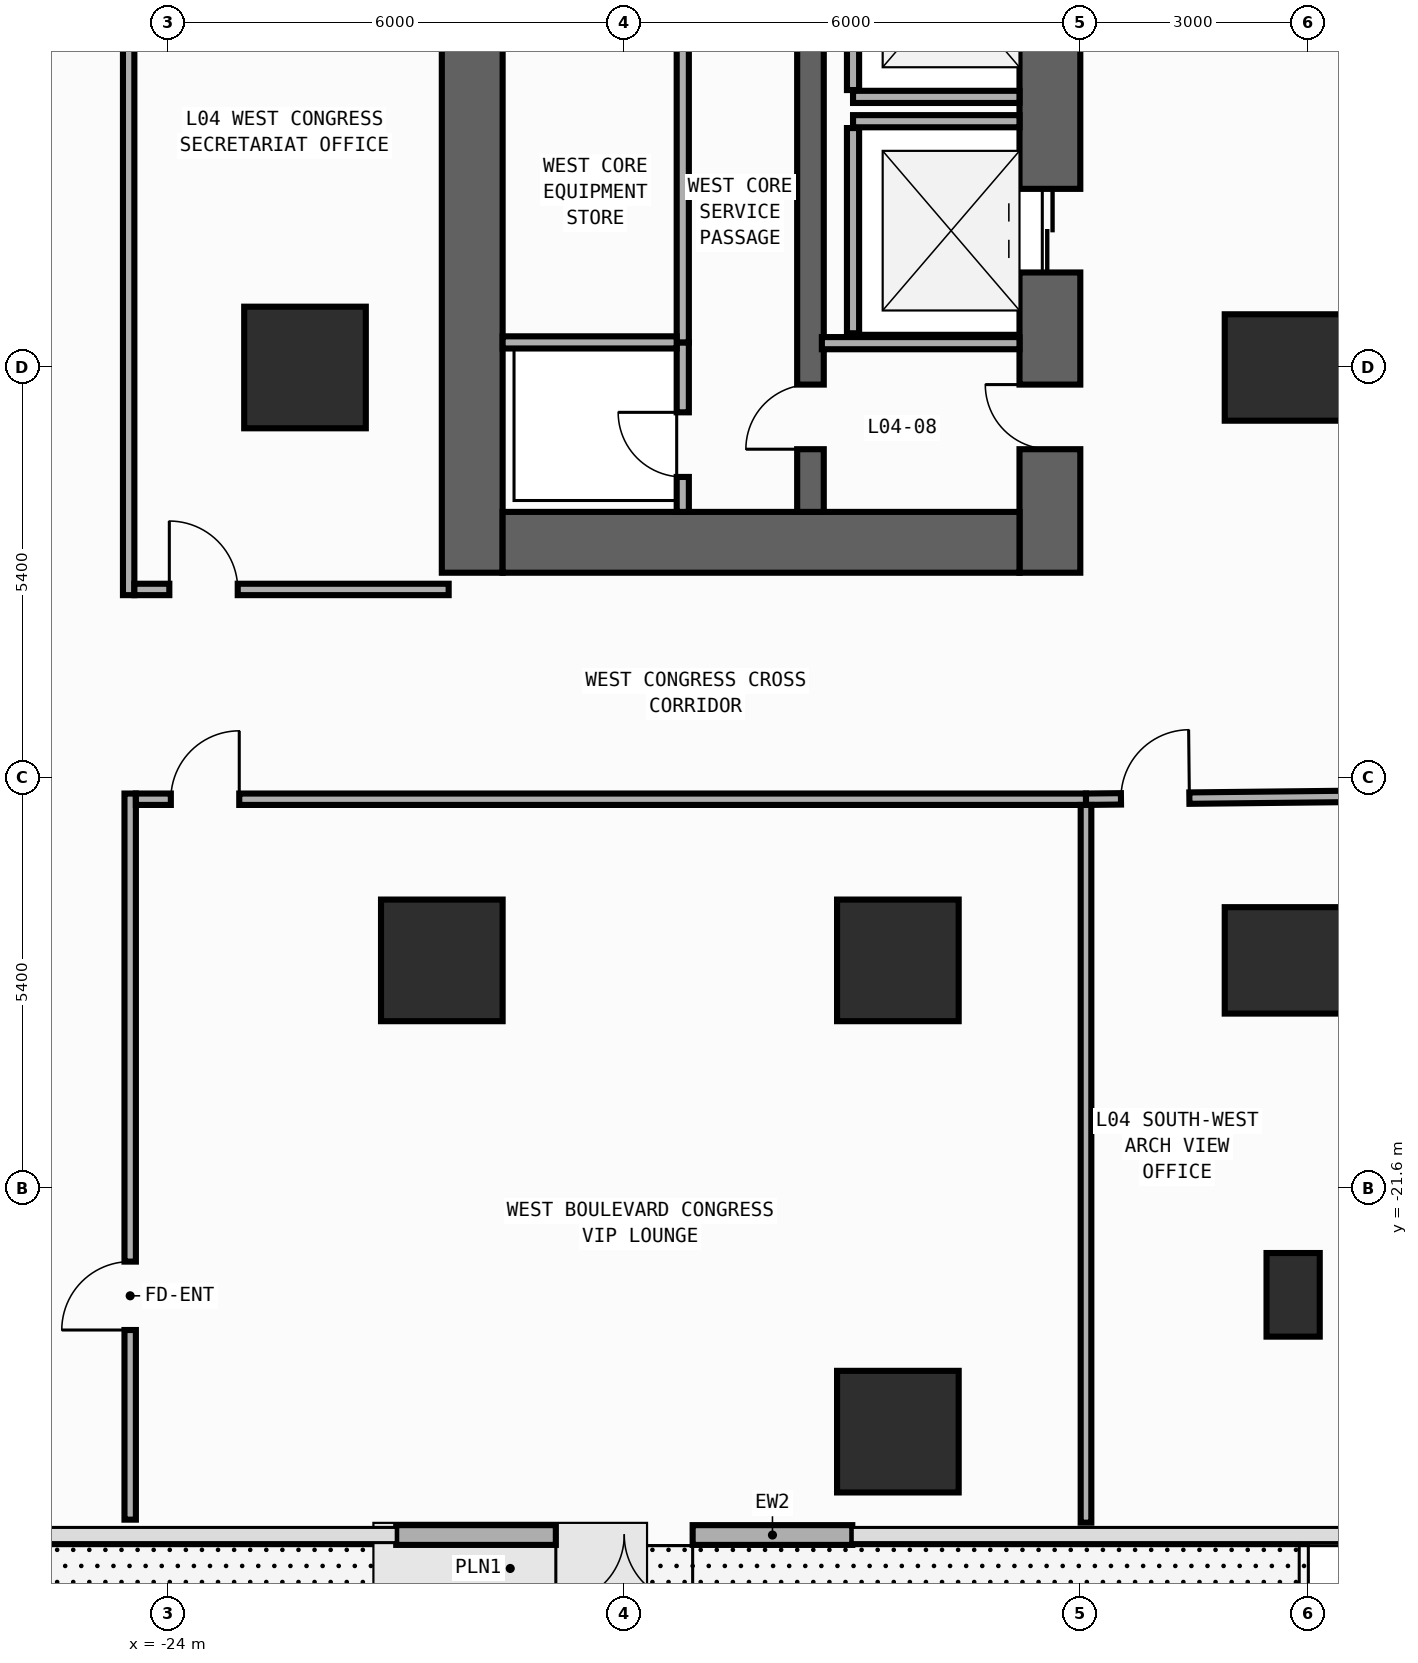
"""IFC4 building model, lengths in metres.
Left out: names, types, materials, properties, quantities, classifications, styles, units other than length and angle.
Written with IfcOpenShell. Run it as: python <this file> out.ifc"""

import sys

from ifc_helpers import new_model, si_unit, direction, frame, frame_2d, origin, origin_2d, place, context, subcontext, project, spatial, rectangle, extrude, element, fill, save


model = new_model("IFC4")
c1 = context("Model", 3, precision=1e-05, world=origin(), true_north=direction((0.0, 1.0)))
c2 = subcontext(c1, "Body", "Model", "MODEL_VIEW")
j1 = project(units=[si_unit("LENGTHUNIT", "METRE"), si_unit("PLANEANGLEUNIT", "RADIAN")], contexts=[c1])
p1 = place(None, origin())
s1 = spatial("IfcSite", under=j1, at=p1, CompositionType="ELEMENT")
p2 = place(p1, origin())
s2 = spatial("IfcBuilding", under=s1, at=p2, CompositionType="ELEMENT")
p3 = place(p2, frame((0.0, 0.0, 16.0)))
s3 = spatial("IfcBuildingStorey", under=s2, at=p3, CompositionType="ELEMENT", Elevation=16.0)
p4 = place(p3, frame((-20.0, -13.5, 0.0), z_axis=(0.0, 0.0, 1.0), x_axis=(0.0, 1.0, 0.0)))
e1 = element("IfcWall", 1, at=p4, inside=s3, PredefinedType="SHEAR", context=c2, shape_type="SweptSolid", body=[
    extrude(rectangle(XDim=27.0, YDim=0.8, at=frame_2d((13.5, 0.0))), origin(), (0.0, 0.0, 1.0), 4.55),
])
p5 = place(p3, frame((-12.4, -13.5, 0.0), z_axis=(0.0, 0.0, 1.0), x_axis=(0.0, 1.0, 0.0)))
e2 = element("IfcWall", 2, at=p5, inside=s3, PredefinedType="SHEAR", context=c2, shape_type="SweptSolid", body=[
    extrude(rectangle(XDim=27.0, YDim=0.8, at=frame_2d((13.5, 0.0))), origin(), (0.0, 0.0, 1.0), 4.55),
])
p6 = place(p5, frame((21.55, 0.0, 0.0)))
e3 = element("IfcOpeningElement", 3, at=p6, cuts=e2, PredefinedType="OPENING", context=c2, shape_type="SweptSolid", body=[
    extrude(rectangle(XDim=1.1, YDim=2.2, at=frame_2d((0.55, 1.1))), frame((0.0, 0.41, 0.0), z_axis=(0.0, -1.0, 0.0), x_axis=(1.0, 0.0, 0.0)), (0.0, 0.0, 1.0), 0.82),
])
p7 = place(p5, frame((18.35, 0.0, 0.0)))
e4 = element("IfcOpeningElement", 4, at=p7, cuts=e2, PredefinedType="OPENING", context=c2, shape_type="SweptSolid", body=[
    extrude(rectangle(XDim=1.1, YDim=2.2, at=frame_2d((0.55, 1.1))), frame((0.0, 0.41, 0.0), z_axis=(0.0, -1.0, 0.0), x_axis=(1.0, 0.0, 0.0)), (0.0, 0.0, 1.0), 0.82),
])
p8 = place(p5, frame((15.15, 0.0, 0.0)))
e5 = element("IfcOpeningElement", 5, at=p8, cuts=e2, PredefinedType="OPENING", context=c2, shape_type="SweptSolid", body=[
    extrude(rectangle(XDim=1.1, YDim=2.2, at=frame_2d((0.55, 1.1))), frame((0.0, 0.41, 0.0), z_axis=(0.0, -1.0, 0.0), x_axis=(1.0, 0.0, 0.0)), (0.0, 0.0, 1.0), 0.82),
])
p9 = place(p5, frame((10.35, 0.0, 0.0)))
e6 = element("IfcOpeningElement", 6, at=p9, cuts=e2, PredefinedType="OPENING", context=c2, shape_type="SweptSolid", body=[
    extrude(rectangle(XDim=1.1, YDim=2.2, at=frame_2d((0.55, 1.1))), frame((0.0, 0.41, 0.0), z_axis=(0.0, -1.0, 0.0), x_axis=(1.0, 0.0, 0.0)), (0.0, 0.0, 1.0), 0.82),
])
p10 = place(p5, frame((7.15, 0.0, 0.0)))
e7 = element("IfcOpeningElement", 7, at=p10, cuts=e2, PredefinedType="OPENING", context=c2, shape_type="SweptSolid", body=[
    extrude(rectangle(XDim=1.1, YDim=2.2, at=frame_2d((0.55, 1.1))), frame((0.0, 0.41, 0.0), z_axis=(0.0, -1.0, 0.0), x_axis=(1.0, 0.0, 0.0)), (0.0, 0.0, 1.0), 0.82),
])
p11 = place(p5, frame((3.95, 0.0, 0.0)))
e8 = element("IfcOpeningElement", 8, at=p11, cuts=e2, PredefinedType="OPENING", context=c2, shape_type="SweptSolid", body=[
    extrude(rectangle(XDim=1.1, YDim=2.2, at=frame_2d((0.55, 1.1))), frame((0.0, 0.41, 0.0), z_axis=(0.0, -1.0, 0.0), x_axis=(1.0, 0.0, 0.0)), (0.0, 0.0, 1.0), 0.82),
])
p12 = place(p5, frame((12.725, 0.0, 0.0)))
e9 = element("IfcOpeningElement", 9, at=p12, cuts=e2, PredefinedType="OPENING", context=c2, shape_type="SweptSolid", body=[
    extrude(rectangle(XDim=1.15, YDim=2.2, at=frame_2d((0.575, 1.1))), frame((0.0, 0.41, 0.0), z_axis=(0.0, -1.0, 0.0), x_axis=(1.0, 0.0, 0.0)), (0.0, 0.0, 1.0), 0.82),
])
p13 = place(p5, frame((1.625, 0.0, 0.0)))
e10 = element("IfcOpeningElement", 10, at=p13, cuts=e2, PredefinedType="OPENING", context=c2, shape_type="SweptSolid", body=[
    extrude(rectangle(XDim=0.85, YDim=2.1, at=frame_2d((0.425, 1.05))), frame((0.0, 0.41, 0.0), z_axis=(0.0, -1.0, 0.0), x_axis=(1.0, 0.0, 0.0)), (0.0, 0.0, 1.0), 0.82),
])
p14 = place(p3, frame((-19.6, -13.1, 0.0), z_axis=(0.0, 0.0, 1.0), x_axis=(1.0, 0.0, 0.0)))
e11 = element("IfcWall", 11, at=p14, inside=s3, PredefinedType="SHEAR", context=c2, shape_type="SweptSolid", body=[
    extrude(rectangle(XDim=6.8, YDim=0.8, at=frame_2d((3.4, 0.0))), origin(), (0.0, 0.0, 1.0), 4.55),
])
p15 = place(p3, frame((-15.55, -12.7, 0.0), z_axis=(0.0, 0.0, 1.0), x_axis=(0.0, 1.0, 0.0)))
e12 = element("IfcWall", 12, at=p15, inside=s3, PredefinedType="SHEAR", context=c2, shape_type="SweptSolid", body=[
    extrude(rectangle(XDim=25.4, YDim=0.35, at=frame_2d((12.7, 0.0))), origin(), (0.0, 0.0, 1.0), 4.55),
])
p16 = place(p15, frame((11.925, 0.0, 0.0)))
e13 = element("IfcOpeningElement", 13, at=p16, cuts=e12, PredefinedType="OPENING", context=c2, shape_type="SweptSolid", body=[
    extrude(rectangle(XDim=1.15, YDim=2.2, at=frame_2d((0.575, 1.1))), frame((0.0, 0.185, 0.0), z_axis=(0.0, -1.0, 0.0), x_axis=(1.0, 0.0, 0.0)), (0.0, 0.0, 1.0), 0.37),
])
p17 = place(p15, frame((0.825, 0.0, 0.0)))
e14 = element("IfcOpeningElement", 14, at=p17, cuts=e12, PredefinedType="OPENING", context=c2, shape_type="SweptSolid", body=[
    extrude(rectangle(XDim=0.85, YDim=2.1, at=frame_2d((0.425, 1.05))), frame((0.0, 0.185, 0.0), z_axis=(0.0, -1.0, 0.0), x_axis=(1.0, 0.0, 0.0)), (0.0, 0.0, 1.0), 0.37),
])
for number, where, z_axis, x_axis in (
    (15, (-9.2, -18.6, 0.0), (0.0, 0.0, 1.0), (1.0, 0.0, 0.0)),
    (16, (-9.2, -10.8, 0.0), (0.0, 0.0, 1.0), (1.0, 0.0, 0.0)),
):
    element("IfcColumn", number, at=place(p3, frame(where, z_axis=z_axis, x_axis=x_axis)), inside=s3, PredefinedType="COLUMN", context=c2, shape_type="SweptSolid", body=[
        extrude(rectangle(XDim=1.8, YDim=1.4, at=origin_2d()), origin(), (0.0, 0.0, 1.0), 5.0),
    ])
for number, where, z_axis, x_axis in (
    (17, (-20.4, -18.6, 0.0), (0.0, 0.0, 1.0), (1.0, 0.0, 0.0)),
    (18, (-14.4, -18.6, 0.0), (0.0, 0.0, 1.0), (1.0, 0.0, 0.0)),
    (19, (-22.2, -10.8, 0.0), (0.0, 0.0, 1.0), (1.0, 0.0, 0.0)),
    (20, (-14.4, -24.8, 0.0), (0.0, 0.0, 1.0), (1.0, 0.0, 0.0)),
):
    element("IfcColumn", number, at=place(p3, frame(where, z_axis=z_axis, x_axis=x_axis)), inside=s3, PredefinedType="COLUMN", context=c2, shape_type="SweptSolid", body=[
        extrude(rectangle(XDim=1.6, YDim=1.6, at=origin_2d()), origin(), (0.0, 0.0, 1.0), 5.0),
    ])
p18 = place(p3, frame((-9.2, -23.0, 0.0), z_axis=(0.0, 0.0, 1.0), x_axis=(1.0, 0.0, 0.0)))
e21 = element("IfcColumn", 21, at=p18, inside=s3, PredefinedType="PILASTER", context=c2, shape_type="SweptSolid", body=[
    extrude(rectangle(XDim=0.7, YDim=1.1, at=origin_2d()), origin(), (0.0, 0.0, 1.0), 5.0),
])
p19 = place(p3, frame((-15.0, -26.16, 0.0), z_axis=(0.0, 0.0, 1.0), x_axis=(-1.0, 0.0, 0.0)))
e22 = element("IfcWall", 22, at=p19, inside=s3, PredefinedType="STANDARD", context=c2, shape_type="SweptSolid", body=[
    extrude(rectangle(XDim=6.0, YDim=0.26, at=frame_2d((3.0, 0.0))), origin(), (0.0, 0.0, 1.0), 4.55),
])
p20 = place(p19, frame((2.1, 0.0, 0.0)))
e23 = element("IfcOpeningElement", 23, at=p20, cuts=e22, PredefinedType="OPENING", context=c2, shape_type="SweptSolid", body=[
    extrude(rectangle(XDim=1.8, YDim=2.3, at=frame_2d((0.9, 1.15))), frame((0.0, 0.14, 0.0), z_axis=(0.0, -1.0, 0.0), x_axis=(1.0, 0.0, 0.0)), (0.0, 0.0, 1.0), 0.28),
])
p21 = place(p3, frame((-14.99, -7.24, 0.0), z_axis=(0.0, 0.0, 1.0), x_axis=(1.0, 0.0, 0.0)))
e24 = element("IfcWall", 24, at=p21, inside=s3, PredefinedType="STANDARD", context=c2, shape_type="SweptSolid", body=[
    extrude(rectangle(XDim=2.19, YDim=0.16, at=frame_2d((1.095, 0.0))), origin(), (0.0, 0.0, 1.0), 4.55),
])
p22 = place(p3, frame((-14.99, -7.15, 0.0), z_axis=(0.0, 0.0, 1.0), x_axis=(0.0, 1.0, 0.0)))
e25 = element("IfcWall", 25, at=p22, inside=s3, PredefinedType="STANDARD", context=c2, shape_type="SweptSolid", body=[
    extrude(rectangle(XDim=2.7, YDim=0.16, at=frame_2d((1.35, 0.0))), origin(), (0.0, 0.0, 1.0), 4.55),
])
p23 = place(p3, frame((-14.99, -7.56, 0.0), z_axis=(0.0, 0.0, 1.0), x_axis=(1.0, 0.0, 0.0)))
e26 = element("IfcWall", 26, at=p23, inside=s3, PredefinedType="STANDARD", context=c2, shape_type="SweptSolid", body=[
    extrude(rectangle(XDim=2.19, YDim=0.16, at=frame_2d((1.095, 0.0))), origin(), (0.0, 0.0, 1.0), 4.55),
])
p24 = place(p3, frame((-14.99, -10.35, 0.0), z_axis=(0.0, 0.0, 1.0), x_axis=(0.0, 1.0, 0.0)))
e27 = element("IfcWall", 27, at=p24, inside=s3, PredefinedType="STANDARD", context=c2, shape_type="SweptSolid", body=[
    extrude(rectangle(XDim=2.7, YDim=0.16, at=frame_2d((1.35, 0.0))), origin(), (0.0, 0.0, 1.0), 4.55),
])
p25 = place(p3, frame((-15.4, -10.48, 0.0), z_axis=(0.0, 0.0, 1.0), x_axis=(1.0, 0.0, 0.0)))
e28 = element("IfcWall", 28, at=p25, inside=s3, PredefinedType="STANDARD", context=c2, shape_type="SweptSolid", body=[
    extrude(rectangle(XDim=2.6, YDim=0.16, at=frame_2d((1.3, 0.0))), origin(), (0.0, 0.0, 1.0), 4.55),
])
p26 = place(p3, frame((-17.23, -12.7, 0.0), z_axis=(0.0, 0.0, 1.0), x_axis=(0.0, 1.0, 0.0)))
e29 = element("IfcWall", 29, at=p26, inside=s3, PredefinedType="PARTITIONING", context=c2, shape_type="SweptSolid", body=[
    extrude(rectangle(XDim=2.23, YDim=0.16, at=frame_2d((1.115, 0.0))), origin(), (0.0, 0.0, 1.0), 4.55),
])
p27 = place(p26, frame((0.46, 0.0, 0.0)))
e30 = element("IfcOpeningElement", 30, at=p27, cuts=e29, PredefinedType="OPENING", context=c2, shape_type="SweptSolid", body=[
    extrude(rectangle(XDim=0.85, YDim=2.1, at=frame_2d((0.425, 1.05))), frame((0.0, 0.09, 0.0), z_axis=(0.0, -1.0, 0.0), x_axis=(1.0, 0.0, 0.0)), (0.0, 0.0, 1.0), 0.18),
])
p28 = place(p3, frame((-17.23, -10.47, 0.0), z_axis=(0.0, 0.0, 1.0), x_axis=(0.0, 1.0, 0.0)))
e31 = element("IfcWall", 31, at=p28, inside=s3, PredefinedType="PARTITIONING", context=c2, shape_type="SweptSolid", body=[
    extrude(rectangle(XDim=5.41, YDim=0.16, at=frame_2d((2.705, 0.0))), origin(), (0.0, 0.0, 1.0), 4.55),
])
p29 = place(p28, frame((4.1, 0.0, 0.0)))
e32 = element("IfcOpeningElement", 32, at=p29, cuts=e31, PredefinedType="OPENING", context=c2, shape_type="SweptSolid", body=[
    extrude(rectangle(XDim=0.85, YDim=2.1, at=frame_2d((0.425, 1.05))), frame((0.0, 0.09, 0.0), z_axis=(0.0, -1.0, 0.0), x_axis=(1.0, 0.0, 0.0)), (0.0, 0.0, 1.0), 0.18),
])
p30 = place(p3, frame((-19.6, -10.47, 0.0), z_axis=(0.0, 0.0, 1.0), x_axis=(1.0, 0.0, 0.0)))
e33 = element("IfcWall", 33, at=p30, inside=s3, PredefinedType="PARTITIONING", context=c2, shape_type="SweptSolid", body=[
    extrude(rectangle(XDim=2.29, YDim=0.16, at=frame_2d((1.145, 0.0))), origin(), (0.0, 0.0, 1.0), 4.55),
])
p31 = place(p3, frame((-24.5, -25.958, 0.0), z_axis=(0.0, 0.0, 1.0), x_axis=(0.0, 1.0, 0.0)))
e34 = element("IfcWall", 34, at=p31, inside=s3, PredefinedType="PARTITIONING", context=c2, shape_type="SweptSolid", body=[
    extrude(rectangle(XDim=9.553, YDim=0.15, at=frame_2d((4.776, 0.0))), origin(), (0.0, 0.0, 1.0), 4.55),
])
p32 = place(p31, frame((2.495, 0.0, 0.0)))
e35 = element("IfcOpeningElement", 35, at=p32, cuts=e34, PredefinedType="OPENING", context=c2, shape_type="SweptSolid", body=[
    extrude(rectangle(XDim=0.9, YDim=2.15, at=frame_2d((0.45, 1.075))), frame((0.0, 0.085, 0.0), z_axis=(0.0, -1.0, 0.0), x_axis=(1.0, 0.0, 0.0)), (0.0, 0.0, 1.0), 0.17),
])
p33 = place(p3, frame((-24.52, -13.795, 0.0), z_axis=(0.0, 0.0, 1.0), x_axis=(0.0, 1.0, 0.0)))
e36 = element("IfcWall", 36, at=p33, inside=s3, PredefinedType="PARTITIONING", context=c2, shape_type="SweptSolid", body=[
    extrude(rectangle(XDim=25.23, YDim=0.15, at=frame_2d((12.615, 0.0))), origin(), (0.0, 0.0, 1.0), 4.55),
])
p34 = place(p33, frame((7.863, 0.0, 0.0)))
e37 = element("IfcOpeningElement", 37, at=p34, cuts=e36, PredefinedType="OPENING", context=c2, shape_type="SweptSolid", body=[
    extrude(rectangle(XDim=0.9, YDim=2.15, at=frame_2d((0.45, 1.075))), frame((0.0, 0.085, 0.0), z_axis=(0.0, -1.0, 0.0), x_axis=(1.0, 0.0, 0.0)), (0.0, 0.0, 1.0), 0.17),
])
p35 = place(p3, frame((-24.425, -16.48, 0.0), z_axis=(0.0, 0.0, 1.0), x_axis=(1.0, 0.0, 0.0)))
e38 = element("IfcWall", 38, at=p35, inside=s3, PredefinedType="PARTITIONING", context=c2, shape_type="SweptSolid", body=[
    extrude(rectangle(XDim=12.5, YDim=0.15, at=frame_2d((6.25, 0.0))), origin(), (0.0, 0.0, 1.0), 4.55),
])
p36 = place(p35, frame((0.46, 0.0, 0.0)))
e39 = element("IfcOpeningElement", 39, at=p36, cuts=e38, PredefinedType="OPENING", context=c2, shape_type="SweptSolid", body=[
    extrude(rectangle(XDim=0.9, YDim=2.15, at=frame_2d((0.45, 1.075))), frame((0.0, 0.085, 0.0), z_axis=(0.0, -1.0, 0.0), x_axis=(1.0, 0.0, 0.0)), (0.0, 0.0, 1.0), 0.17),
])
p37 = place(p3, frame((-24.445, -13.72, 0.0), z_axis=(0.0, 0.0, 1.0), x_axis=(1.0, 0.0, 0.0)))
e40 = element("IfcWall", 40, at=p37, inside=s3, PredefinedType="PARTITIONING", context=c2, shape_type="SweptSolid", body=[
    extrude(rectangle(XDim=4.135, YDim=0.15, at=frame_2d((2.067, 0.0))), origin(), (0.0, 0.0, 1.0), 4.55),
])
p38 = place(p37, frame((0.46, 0.0, 0.0)))
e41 = element("IfcOpeningElement", 41, at=p38, cuts=e40, PredefinedType="OPENING", context=c2, shape_type="SweptSolid", body=[
    extrude(rectangle(XDim=0.9, YDim=2.15, at=frame_2d((0.45, 1.075))), frame((0.0, 0.085, 0.0), z_axis=(0.0, -1.0, 0.0), x_axis=(1.0, 0.0, 0.0)), (0.0, 0.0, 1.0), 0.17),
])
p39 = place(p3, frame((-11.925, -16.48, 0.0), z_axis=(0.0, 0.0, 1.0), x_axis=(0.999942081003, 0.010762650212, 0.0)))
e42 = element("IfcWall", 42, at=p39, inside=s3, PredefinedType="PARTITIONING", context=c2, shape_type="SweptSolid", body=[
    extrude(rectangle(XDim=3.72, YDim=0.15, at=frame_2d((1.86, 0.0))), origin(), (0.0, 0.0, 1.0), 4.55),
])
p40 = place(p39, frame((0.46, 0.0, 0.0)))
e43 = element("IfcOpeningElement", 43, at=p40, cuts=e42, PredefinedType="OPENING", context=c2, shape_type="SweptSolid", body=[
    extrude(rectangle(XDim=0.9, YDim=2.15, at=frame_2d((0.45, 1.075))), frame((0.0, 0.085, 0.0), z_axis=(0.0, -1.0, 0.0), x_axis=(1.0, 0.0, 0.0)), (0.0, 0.0, 1.0), 0.17),
])
p41 = place(p3, frame((-11.925, -25.998, 0.0), z_axis=(0.0, 0.0, 1.0), x_axis=(0.0, 1.0, 0.0)))
e44 = element("IfcWall", 44, at=p41, inside=s3, PredefinedType="PARTITIONING", context=c2, shape_type="SweptSolid", body=[
    extrude(rectangle(XDim=9.443, YDim=0.14, at=frame_2d((4.721, 0.0))), origin(), (0.0, 0.0, 1.0), 4.55),
])
p42 = place(p20, origin())
e45 = element("IfcDoor", 45, at=p42, inside=s3, OperationType="DOUBLE_DOOR_SINGLE_SWING", PredefinedType="DOOR", context=c2, shape_type="SweptSolid", body=[
    extrude(rectangle(XDim=1.8, YDim=2.3, at=frame_2d((0.9, 1.15))), frame((0.0, 0.025, 0.0), z_axis=(0.0, -1.0, 0.0), x_axis=(1.0, 0.0, 0.0)), (0.0, 0.0, 1.0), 0.05),
])
fill(e23, e45)
p43 = place(p11, origin())
e46 = element("IfcDoor", 46, at=p43, inside=s3, OperationType="DOUBLE_DOOR_SLIDING", PredefinedType="DOOR", context=c2, shape_type="SweptSolid", body=[
    extrude(rectangle(XDim=1.1, YDim=2.2, at=frame_2d((0.55, 1.1))), frame((0.0, 0.025, 0.0), z_axis=(0.0, -1.0, 0.0), x_axis=(1.0, 0.0, 0.0)), (0.0, 0.0, 1.0), 0.05),
])
fill(e8, e46)
p44 = place(p13, origin())
e47 = element("IfcDoor", 47, at=p44, inside=s3, OperationType="SINGLE_SWING_RIGHT", PredefinedType="DOOR", context=c2, shape_type="SweptSolid", body=[
    extrude(rectangle(XDim=0.85, YDim=2.1, at=frame_2d((0.425, 1.05))), frame((0.0, 0.025, 0.0), z_axis=(0.0, -1.0, 0.0), x_axis=(1.0, 0.0, 0.0)), (0.0, 0.0, 1.0), 0.05),
])
fill(e10, e47)
p45 = place(p17, origin())
e48 = element("IfcDoor", 48, at=p45, inside=s3, OperationType="SINGLE_SWING_LEFT", PredefinedType="DOOR", context=c2, shape_type="SweptSolid", body=[
    extrude(rectangle(XDim=0.85, YDim=2.1, at=frame_2d((0.425, 1.05))), frame((0.0, 0.025, 0.0), z_axis=(0.0, -1.0, 0.0), x_axis=(1.0, 0.0, 0.0)), (0.0, 0.0, 1.0), 0.05),
])
fill(e14, e48)
p46 = place(p27, origin())
e49 = element("IfcDoor", 49, at=p46, inside=s3, OperationType="SINGLE_SWING_RIGHT", PredefinedType="DOOR", context=c2, shape_type="SweptSolid", body=[
    extrude(rectangle(XDim=0.85, YDim=2.1, at=frame_2d((0.425, 1.05))), frame((0.0, 0.025, 0.0), z_axis=(0.0, -1.0, 0.0), x_axis=(1.0, 0.0, 0.0)), (0.0, 0.0, 1.0), 0.05),
])
fill(e30, e49)
p47 = place(p32, origin())
e50 = element("IfcDoor", 50, at=p47, inside=s3, OperationType="SINGLE_SWING_LEFT", PredefinedType="DOOR", context=c2, shape_type="SweptSolid", body=[
    extrude(rectangle(XDim=0.9, YDim=2.15, at=frame_2d((0.45, 1.075))), frame((0.0, 0.025, 0.0), z_axis=(0.0, -1.0, 0.0), x_axis=(1.0, 0.0, 0.0)), (0.0, 0.0, 1.0), 0.05),
])
fill(e35, e50)
p48 = place(p36, origin())
e51 = element("IfcDoor", 51, at=p48, inside=s3, OperationType="SINGLE_SWING_RIGHT", PredefinedType="DOOR", context=c2, shape_type="SweptSolid", body=[
    extrude(rectangle(XDim=0.9, YDim=2.15, at=frame_2d((0.45, 1.075))), frame((0.0, 0.025, 0.0), z_axis=(0.0, -1.0, 0.0), x_axis=(1.0, 0.0, 0.0)), (0.0, 0.0, 1.0), 0.05),
])
fill(e39, e51)
p49 = place(p38, origin())
e52 = element("IfcDoor", 52, at=p49, inside=s3, OperationType="SINGLE_SWING_LEFT", PredefinedType="DOOR", context=c2, shape_type="SweptSolid", body=[
    extrude(rectangle(XDim=0.9, YDim=2.15, at=frame_2d((0.45, 1.075))), frame((0.0, 0.025, 0.0), z_axis=(0.0, -1.0, 0.0), x_axis=(1.0, 0.0, 0.0)), (0.0, 0.0, 1.0), 0.05),
])
fill(e41, e52)
p50 = place(p40, origin())
e53 = element("IfcDoor", 53, at=p50, inside=s3, OperationType="SINGLE_SWING_RIGHT", PredefinedType="DOOR", context=c2, shape_type="SweptSolid", body=[
    extrude(rectangle(XDim=0.9, YDim=2.15, at=frame_2d((0.45, 1.075))), frame((0.0, 0.025, 0.0), z_axis=(0.0, -1.0, 0.0), x_axis=(1.0, 0.0, 0.0)), (0.0, 0.0, 1.0), 0.05),
])
fill(e43, e53)
save(model, sys.argv[1])
